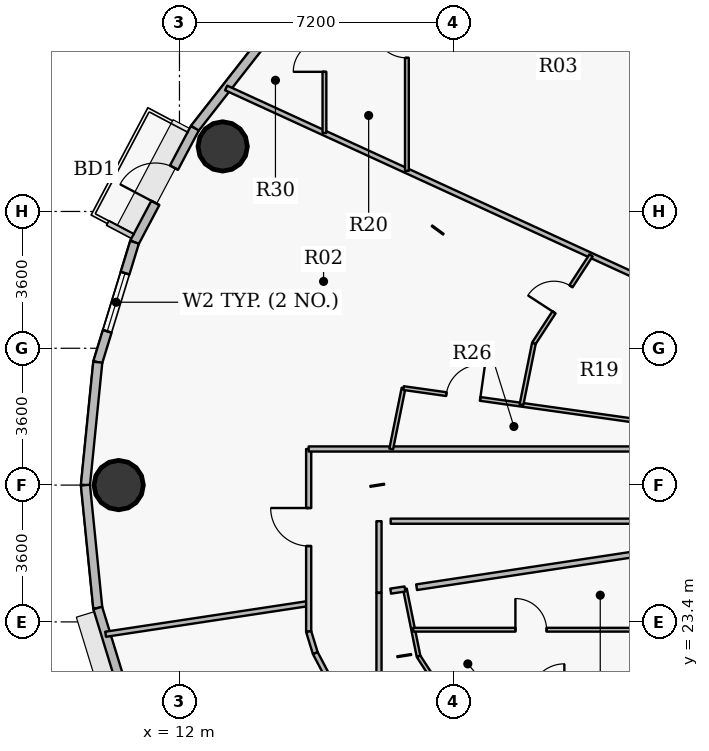
"""IFC4 building model, lengths in metres.
Left out: names, types, materials, properties, quantities, classifications, styles, units other than length and angle.
Written with IfcOpenShell. Run it as: python <this file> out.ifc"""

import sys

from ifc_helpers import new_model, si_unit, direction, frame, frame_2d, origin, origin_2d, place, context, subcontext, project, spatial, rectangle, hollow_circle, extrude, source, transform, mapped, element, fill, save


model = new_model("IFC4")
c1 = context("Model", 3, precision=1e-05, world=origin(), true_north=direction((0.0, 1.0)))
c2 = subcontext(c1, "Body", "Model", "MODEL_VIEW")
j1 = project(units=[si_unit("LENGTHUNIT", "METRE"), si_unit("PLANEANGLEUNIT", "RADIAN")], contexts=[c1])
p1 = place(None, origin())
s1 = spatial("IfcSite", under=j1, at=p1, CompositionType="ELEMENT")
p2 = place(p1, origin())
s2 = spatial("IfcBuilding", under=s1, at=p2, CompositionType="ELEMENT")
p3 = place(p2, frame((0.0, 0.0, 156.15)))
s3 = spatial("IfcBuildingStorey", under=s2, at=p3, CompositionType="ELEMENT", Elevation=156.15)
for number, where, z_axis, x_axis in (
    (1, (13.137, 35.911, 0.0), (0.0, 0.0, 1.0), (1.0, 0.0, 0.0)),
    (2, (10.4, 27.0, 0.0), (0.0, 0.0, 1.0), (1.0, 0.0, 0.0)),
):
    element("IfcColumn", number, at=place(p3, frame(where, z_axis=z_axis, x_axis=x_axis)), inside=s3, PredefinedType="COLUMN", context=c2, shape_type="SweptSolid", body=[
        extrude(hollow_circle(Radius=0.65, WallThickness=0.04, at=origin_2d()), origin(), (0.0, 0.0, 1.0), 3.75),
    ])
p4 = place(p3, frame((12.404, 36.388, 0.0), z_axis=(0.0, 0.0, 1.0), x_axis=(0.616287674549, 0.787521112224, 0.0)))
e3 = element("IfcWall", 3, at=p4, inside=s3, PredefinedType="SOLIDWALL", context=c2, shape_type="SweptSolid", body=[
    extrude(rectangle(XDim=3.517, YDim=0.24, at=frame_2d((1.759, 0.0))), origin(), (0.0, 0.0, 1.0), 3.5),
])
p5 = place(p3, frame((10.817, 33.389, 0.0), z_axis=(0.0, 0.0, 1.0), x_axis=(0.467586874938, 0.88394712194, 0.0)))
e4 = element("IfcWall", 4, at=p5, inside=s3, PredefinedType="SOLIDWALL", context=c2, shape_type="SweptSolid", body=[
    extrude(rectangle(XDim=3.393, YDim=0.24, at=frame_2d((1.697, 0.0))), origin(), (0.0, 0.0, 1.0), 3.5),
])
p6 = place(p5, frame((1.172, 0.0, 0.0)))
e5 = element("IfcOpeningElement", 5, at=p6, cuts=e4, PredefinedType="OPENING", context=c2, shape_type="SweptSolid", body=[
    extrude(rectangle(XDim=1.05, YDim=2.15, at=origin_2d()), frame((0.525, 0.13, 1.075), z_axis=(0.0, -1.0, 0.0), x_axis=(1.0, 0.0, 0.0)), (0.0, 0.0, 1.0), 0.26),
])
p7 = place(p3, frame((9.85, 30.234, 0.0), z_axis=(0.0, 0.0, 1.0), x_axis=(0.293097995113, 0.956082405058, 0.0)))
e6 = element("IfcWall", 6, at=p7, inside=s3, PredefinedType="SOLIDWALL", context=c2, shape_type="SweptSolid", body=[
    extrude(rectangle(XDim=3.3, YDim=0.24, at=frame_2d((1.65, 0.0))), origin(), (0.0, 0.0, 1.0), 3.5),
])
p8 = place(p7, frame((0.85, 0.0, 0.9)))
e7 = element("IfcOpeningElement", 7, at=p8, cuts=e6, PredefinedType="OPENING", context=c2, shape_type="SweptSolid", body=[
    extrude(rectangle(XDim=1.6, YDim=1.75, at=origin_2d()), frame((0.8, 0.13, 0.875), z_axis=(0.0, -1.0, 0.0), x_axis=(1.0, 0.0, 0.0)), (0.0, 0.0, 1.0), 0.26),
])
for number, where, z_axis, x_axis in (
    (8, (9.525, 27.0, 0.0), (0.0, 0.0, 1.0), (0.1, 0.995, 0.0)),
    (9, (9.85, 23.766, 0.0), (0.0, 0.0, 1.0), (-0.1, 0.995, 0.0)),
):
    element("IfcWall", number, at=place(p3, frame(where, z_axis=z_axis, x_axis=x_axis)), inside=s3, PredefinedType="SOLIDWALL", context=c2, shape_type="SweptSolid", body=[
        extrude(rectangle(XDim=3.25, YDim=0.24, at=frame_2d((1.625, 0.0))), origin(), (0.0, 0.0, 1.0), 3.5),
    ])
p9 = place(p3, frame((10.817, 20.611, 0.0), z_axis=(0.0, 0.0, 1.0), x_axis=(-0.293097995113, 0.956082405058, 0.0)))
e10 = element("IfcWall", 10, at=p9, inside=s3, PredefinedType="SOLIDWALL", context=c2, shape_type="SweptSolid", body=[
    extrude(rectangle(XDim=3.3, YDim=0.24, at=frame_2d((1.65, 0.0))), origin(), (0.0, 0.0, 1.0), 3.5),
])
p10 = place(p3, frame((10.057, 23.075, 0.0), z_axis=(0.0, 0.0, 1.0), x_axis=(0.988756022356, 0.14953771516, 0.0)))
e11 = element("IfcWall", 11, at=p10, inside=s3, PredefinedType="PARTITIONING", context=c2, shape_type="SweptSolid", body=[
    extrude(rectangle(XDim=5.404, YDim=0.135, at=frame_2d((2.702, 0.0))), origin(), (0.0, 0.0, 1.0), 2.935),
])
p11 = place(p3, frame((13.229, 37.45, 0.0), z_axis=(0.0, 0.0, 1.0), x_axis=(0.908867611309, -0.417084721746, 0.0)))
e12 = element("IfcWall", 12, at=p11, inside=s3, PredefinedType="PARTITIONING", context=c2, shape_type="SweptSolid", body=[
    extrude(rectangle(XDim=12.237, YDim=0.135, at=frame_2d((6.118, 0.0))), origin(), (0.0, 0.0, 1.0), 2.935),
])
p12 = place(p3, frame((15.4, 23.146, 0.0), z_axis=(0.0, 0.0, 1.0), x_axis=(0.0, 1.0, 0.0)))
e13 = element("IfcWall", 13, at=p12, inside=s3, PredefinedType="PARTITIONING", context=c2, shape_type="SweptSolid", body=[
    extrude(rectangle(XDim=4.804, YDim=0.135, at=frame_2d((2.402, 0.0))), origin(), (0.0, 0.0, 1.0), 2.935),
])
p13 = place(p12, frame((2.251, 0.0, 0.0)))
e14 = element("IfcOpeningElement", 14, at=p13, cuts=e13, PredefinedType="OPENING", context=c2, shape_type="SweptSolid", body=[
    extrude(rectangle(XDim=1.0, YDim=2.15, at=origin_2d()), frame((0.5, 0.078, 1.075), z_axis=(0.0, -1.0, 0.0), x_axis=(1.0, 0.0, 0.0)), (0.0, 0.0, 1.0), 0.155),
])
p14 = place(p3, frame((15.4, 23.146, 0.0), z_axis=(0.0, 0.0, 1.0), x_axis=(0.293335154151, -0.956009669061, 0.0)))
e15 = element("IfcWall", 15, at=p14, inside=s3, PredefinedType="PARTITIONING", context=c2, shape_type="SweptSolid", body=[
    extrude(rectangle(XDim=0.594, YDim=0.135, at=frame_2d((0.297, 0.0))), origin(), (0.0, 0.0, 1.0), 3.5),
])
p15 = place(p3, frame((15.4, 27.95, 0.0), z_axis=(0.0, 0.0, 1.0), x_axis=(1.0, 0.0, 0.0)))
e16 = element("IfcWall", 16, at=p15, inside=s3, PredefinedType="PARTITIONING", context=c2, shape_type="SweptSolid", body=[
    extrude(rectangle(XDim=8.95, YDim=0.135, at=frame_2d((4.475, 0.0))), origin(), (0.0, 0.0, 1.0), 3.5),
])
p16 = place(p3, frame((15.574, 22.578, 0.0), z_axis=(0.0, 0.0, 1.0), x_axis=(0.46757196543, -0.883955008552, 0.0)))
e17 = element("IfcWall", 17, at=p16, inside=s3, PredefinedType="PARTITIONING", context=c2, shape_type="SweptSolid", body=[
    extrude(rectangle(XDim=2.451, YDim=0.135, at=frame_2d((1.226, 0.0))), origin(), (0.0, 0.0, 1.0), 2.935),
])
p17 = place(p3, frame((15.815, 36.263, 0.0), z_axis=(0.0, 0.0, 1.0), x_axis=(0.0, 1.0, 0.0)))
e18 = element("IfcWall", 18, at=p17, inside=s3, PredefinedType="PARTITIONING", context=c2, shape_type="SweptSolid", body=[
    extrude(rectangle(XDim=4.042, YDim=0.1, at=frame_2d((2.021, 0.0))), origin(), (0.0, 0.0, 1.0), 2.935),
])
p18 = place(p17, frame((1.611, 0.0, 0.0)))
e19 = element("IfcOpeningElement", 19, at=p18, cuts=e18, PredefinedType="OPENING", context=c2, shape_type="SweptSolid", body=[
    extrude(rectangle(XDim=0.82, YDim=2.1, at=origin_2d()), frame((0.41, 0.06, 1.05), z_axis=(0.0, -1.0, 0.0), x_axis=(1.0, 0.0, 0.0)), (0.0, 0.0, 1.0), 0.12),
])
p19 = place(p3, frame((17.25, 19.734, 0.0), z_axis=(0.0, 0.0, 1.0), x_axis=(0.0, 1.0, 0.0)))
e20 = element("IfcWall", 20, at=p19, inside=s3, PredefinedType="PARTITIONING", context=c2, shape_type="SweptSolid", body=[
    extrude(rectangle(XDim=4.429, YDim=0.135, at=frame_2d((2.215, 0.0))), origin(), (0.0, 0.0, 1.0), 2.935),
])
p20 = place(p3, frame((17.572, 27.95, 0.0), z_axis=(0.0, 0.0, 1.0), x_axis=(0.19821259699, 0.98015905158, 0.0)))
e21 = element("IfcWall", 21, at=p20, inside=s3, PredefinedType="PARTITIONING", context=c2, shape_type="SweptSolid", body=[
    extrude(rectangle(XDim=1.635, YDim=0.1, at=frame_2d((0.817, 0.0))), origin(), (0.0, 0.0, 1.0), 3.5),
])
p21 = place(p3, frame((17.896, 29.552, 0.0), z_axis=(0.0, 0.0, 1.0), x_axis=(0.990212218954, -0.139569915938, 0.0)))
e22 = element("IfcWall", 22, at=p21, inside=s3, PredefinedType="PARTITIONING", context=c2, shape_type="SweptSolid", body=[
    extrude(rectangle(XDim=6.518, YDim=0.1, at=frame_2d((3.259, 0.0))), origin(), (0.0, 0.0, 1.0), 3.5),
])
p22 = place(p21, frame((1.137, 0.0, 0.0)))
e23 = element("IfcOpeningElement", 23, at=p22, cuts=e22, PredefinedType="OPENING", context=c2, shape_type="SweptSolid", body=[
    extrude(rectangle(XDim=0.9, YDim=2.1, at=origin_2d()), frame((0.45, 0.06, 1.05), z_axis=(0.0, -1.0, 0.0), x_axis=(1.0, 0.0, 0.0)), (0.0, 0.0, 1.0), 0.12),
])
p23 = place(p3, frame((17.933, 24.267, 0.0), z_axis=(0.0, 0.0, 1.0), x_axis=(0.198166528342, -0.980168366682, 0.0)))
e24 = element("IfcWall", 24, at=p23, inside=s3, PredefinedType="PARTITIONING", context=c2, shape_type="SweptSolid", body=[
    extrude(rectangle(XDim=1.809, YDim=0.1, at=frame_2d((0.904, 0.0))), origin(), (0.0, 0.0, 1.0), 2.935),
])
p24 = place(p3, frame((17.984, 35.267, 0.0), z_axis=(0.0, 0.0, 1.0), x_axis=(0.0, 1.0, 0.0)))
e25 = element("IfcWall", 25, at=p24, inside=s3, PredefinedType="PARTITIONING", context=c2, shape_type="SweptSolid", body=[
    extrude(rectangle(XDim=6.848, YDim=0.1, at=frame_2d((3.424, 0.0))), origin(), (0.0, 0.0, 1.0), 2.935),
])
p25 = place(p24, frame((2.974, 0.0, 0.0)))
e26 = element("IfcOpeningElement", 26, at=p25, cuts=e25, PredefinedType="OPENING", context=c2, shape_type="SweptSolid", body=[
    extrude(rectangle(XDim=0.9, YDim=2.1, at=origin_2d()), frame((0.45, 0.06, 1.05), z_axis=(0.0, -1.0, 0.0), x_axis=(1.0, 0.0, 0.0)), (0.0, 0.0, 1.0), 0.12),
])
p26 = place(p3, frame((18.15, 23.195, 0.0), z_axis=(0.0, 0.0, 1.0), x_axis=(1.0, 0.0, 0.0)))
e27 = element("IfcWall", 27, at=p26, inside=s3, PredefinedType="PARTITIONING", context=c2, shape_type="SweptSolid", body=[
    extrude(rectangle(XDim=6.2, YDim=0.1, at=frame_2d((3.1, 0.0))), origin(), (0.0, 0.0, 1.0), 2.935),
])
p27 = place(p26, frame((2.69, 0.0, 0.0)))
e28 = element("IfcOpeningElement", 28, at=p27, cuts=e27, PredefinedType="OPENING", context=c2, shape_type="SweptSolid", body=[
    extrude(rectangle(XDim=0.82, YDim=2.1, at=origin_2d()), frame((0.41, 0.06, 1.05), z_axis=(0.0, -1.0, 0.0), x_axis=(1.0, 0.0, 0.0)), (0.0, 0.0, 1.0), 0.12),
])
p28 = place(p3, frame((18.291, 22.494, 0.0), z_axis=(0.0, 0.0, 1.0), x_axis=(0.545405921784, -0.838172047066, 0.0)))
e29 = element("IfcWall", 29, at=p28, inside=s3, PredefinedType="PARTITIONING", context=c2, shape_type="SweptSolid", body=[
    extrude(rectangle(XDim=4.849, YDim=0.1, at=frame_2d((2.425, 0.0))), origin(), (0.0, 0.0, 1.0), 2.935),
])
p29 = place(p28, frame((1.962, 0.0, 0.0)))
e30 = element("IfcOpeningElement", 30, at=p29, cuts=e29, PredefinedType="OPENING", context=c2, shape_type="SweptSolid", body=[
    extrude(rectangle(XDim=0.9, YDim=2.1, at=origin_2d()), frame((0.45, 0.06, 1.05), z_axis=(0.0, -1.0, 0.0), x_axis=(1.0, 0.0, 0.0)), (0.0, 0.0, 1.0), 0.12),
])
p30 = place(p3, frame((21.0, 29.115, 0.0), z_axis=(0.0, 0.0, 1.0), x_axis=(0.198219197437, 0.980157716782, 0.0)))
e31 = element("IfcWall", 31, at=p30, inside=s3, PredefinedType="PARTITIONING", context=c2, shape_type="SweptSolid", body=[
    extrude(rectangle(XDim=1.652, YDim=0.1, at=frame_2d((0.826, 0.0))), origin(), (0.0, 0.0, 1.0), 3.5),
])
p31 = place(p3, frame((21.327, 30.733, 0.0), z_axis=(0.0, 0.0, 1.0), x_axis=(0.545365017792, 0.838198662233, 0.0)))
e32 = element("IfcWall", 32, at=p31, inside=s3, PredefinedType="PARTITIONING", context=c2, shape_type="SweptSolid", body=[
    extrude(rectangle(XDim=2.756, YDim=0.1, at=frame_2d((1.378, 0.0))), origin(), (0.0, 0.0, 1.0), 2.935),
])
p32 = place(p31, frame((0.968, 0.0, 0.0)))
e33 = element("IfcOpeningElement", 33, at=p32, cuts=e32, PredefinedType="OPENING", context=c2, shape_type="SweptSolid", body=[
    extrude(rectangle(XDim=0.82, YDim=2.1, at=origin_2d()), frame((0.41, 0.06, 1.05), z_axis=(0.0, -1.0, 0.0), x_axis=(1.0, 0.0, 0.0)), (0.0, 0.0, 1.0), 0.12),
])
p33 = place(p3, frame((17.25, 26.05, 0.0), z_axis=(0.0, 0.0, 1.0), x_axis=(0.0, -1.0, 0.0)))
e34 = element("IfcWall", 34, at=p33, inside=s3, PredefinedType="PARTITIONING", context=c2, shape_type="SweptSolid", body=[
    extrude(rectangle(XDim=1.876, YDim=0.135, at=frame_2d((0.938, 0.0))), origin(), (0.0, 0.0, 1.0), 3.185),
])
p34 = place(p3, frame((24.042, 26.05, 0.0), z_axis=(0.0, 0.0, 1.0), x_axis=(-1.0, 0.0, 0.0)))
e35 = element("IfcWall", 35, at=p34, inside=s3, PredefinedType="PARTITIONING", context=c2, shape_type="SweptSolid", body=[
    extrude(rectangle(XDim=6.485, YDim=0.135, at=frame_2d((3.242, 0.0))), origin(), (0.0, 0.0, 1.0), 3.5),
])
p35 = place(p3, frame((17.558, 24.21, 0.0), z_axis=(0.0, 0.0, 1.0), x_axis=(0.988703952477, 0.149881601124, 0.0)))
e36 = element("IfcWall", 36, at=p35, inside=s3, PredefinedType="PARTITIONING", context=c2, shape_type="SweptSolid", body=[
    extrude(rectangle(XDim=0.38, YDim=0.135, at=frame_2d((0.19, 0.0))), origin(), (0.0, 0.0, 1.0), 3.185),
])
p36 = place(p3, frame((18.24, 24.313, 0.0), z_axis=(0.0, 0.0, 1.0), x_axis=(0.988751262043, 0.149569187364, 0.0)))
e37 = element("IfcWall", 37, at=p36, inside=s3, PredefinedType="PARTITIONING", context=c2, shape_type="SweptSolid", body=[
    extrude(rectangle(XDim=5.848, YDim=0.15, at=frame_2d((2.924, 0.0))), origin(), (0.0, 0.0, 1.0), 3.5),
])
m1 = source(origin(), c2, "Body", "SweptSolid", [
    extrude(rectangle(XDim=1.05, YDim=2.15, at=origin_2d()), frame((0.525, 0.025, 1.075), z_axis=(0.0, -1.0, 0.0), x_axis=(1.0, 0.0, 0.0)), (0.0, 0.0, 1.0), 0.05),
])
p37 = place(p6, origin())
e38 = element("IfcDoor", 38, at=p37, inside=s3, OperationType="SINGLE_SWING_LEFT", PredefinedType="DOOR", context=c2, shape_type="MappedRepresentation", body=[
    mapped(m1, transform((0.0, 0.0, 0.0), x_axis=(1.0, 0.0, 0.0), y_axis=(0.0, 1.0, 0.0), z_axis=(0.0, 0.0, 1.0), scale=1.0)),
])
fill(e5, e38)
m2 = source(origin(), c2, "Body", "SweptSolid", [
    extrude(rectangle(XDim=1.6, YDim=1.75, at=origin_2d()), frame((0.8, 0.03, 0.875), z_axis=(0.0, -1.0, 0.0), x_axis=(1.0, 0.0, 0.0)), (0.0, 0.0, 1.0), 0.06),
])
p38 = place(p8, origin())
e39 = element("IfcWindow", 39, at=p38, inside=s3, PartitioningType="DOUBLE_PANEL_VERTICAL", PredefinedType="WINDOW", context=c2, shape_type="MappedRepresentation", body=[
    mapped(m2, transform((0.0, 0.0, 0.0), x_axis=(1.0, 0.0, 0.0), y_axis=(0.0, 1.0, 0.0), z_axis=(0.0, 0.0, 1.0), scale=1.0)),
])
fill(e7, e39)
m3 = source(origin(), c2, "Body", "SweptSolid", [
    extrude(rectangle(XDim=0.9, YDim=2.1, at=origin_2d()), frame((0.45, 0.025, 1.05), z_axis=(0.0, -1.0, 0.0), x_axis=(1.0, 0.0, 0.0)), (0.0, 0.0, 1.0), 0.05),
])
p39 = place(p25, origin())
e40 = element("IfcDoor", 40, at=p39, inside=s3, OperationType="SINGLE_SWING_RIGHT", PredefinedType="DOOR", context=c2, shape_type="MappedRepresentation", body=[
    mapped(m3, transform((0.0, 0.0, 0.0), x_axis=(1.0, 0.0, 0.0), y_axis=(0.0, 1.0, 0.0), z_axis=(0.0, 0.0, 1.0), scale=1.0)),
])
fill(e26, e40)
m4 = source(origin(), c2, "Body", "SweptSolid", [
    extrude(rectangle(XDim=0.82, YDim=2.1, at=origin_2d()), frame((0.41, 0.025, 1.05), z_axis=(0.0, -1.0, 0.0), x_axis=(1.0, 0.0, 0.0)), (0.0, 0.0, 1.0), 0.05),
])
p40 = place(p18, origin())
e41 = element("IfcDoor", 41, at=p40, inside=s3, OperationType="SINGLE_SWING_LEFT", PredefinedType="DOOR", context=c2, shape_type="MappedRepresentation", body=[
    mapped(m4, transform((0.0, 0.0, 0.0), x_axis=(1.0, 0.0, 0.0), y_axis=(0.0, 1.0, 0.0), z_axis=(0.0, 0.0, 1.0), scale=1.0)),
])
fill(e19, e41)
m5 = source(origin(), c2, "Body", "SweptSolid", [
    extrude(rectangle(XDim=1.0, YDim=2.15, at=origin_2d()), frame((0.5, 0.025, 1.075), z_axis=(0.0, -1.0, 0.0), x_axis=(1.0, 0.0, 0.0)), (0.0, 0.0, 1.0), 0.05),
])
p41 = place(p13, origin())
e42 = element("IfcDoor", 42, at=p41, inside=s3, OperationType="SINGLE_SWING_RIGHT", PredefinedType="DOOR", context=c2, shape_type="MappedRepresentation", body=[
    mapped(m5, transform((0.0, 0.0, 0.0), x_axis=(1.0, 0.0, 0.0), y_axis=(0.0, 1.0, 0.0), z_axis=(0.0, 0.0, 1.0), scale=1.0)),
])
fill(e14, e42)
p42 = place(p32, origin())
e43 = element("IfcDoor", 43, at=p42, inside=s3, OperationType="SINGLE_SWING_LEFT", PredefinedType="DOOR", context=c2, shape_type="MappedRepresentation", body=[
    mapped(m4, transform((0.0, 0.0, 0.0), x_axis=(1.0, 0.0, 0.0), y_axis=(0.0, 1.0, 0.0), z_axis=(0.0, 0.0, 1.0), scale=1.0)),
])
fill(e33, e43)
p43 = place(p22, origin())
e44 = element("IfcDoor", 44, at=p43, inside=s3, OperationType="SINGLE_SWING_RIGHT", PredefinedType="DOOR", context=c2, shape_type="MappedRepresentation", body=[
    mapped(m3, transform((0.0, 0.0, 0.0), x_axis=(1.0, 0.0, 0.0), y_axis=(0.0, 1.0, 0.0), z_axis=(0.0, 0.0, 1.0), scale=1.0)),
])
fill(e23, e44)
p44 = place(p27, origin())
e45 = element("IfcDoor", 45, at=p44, inside=s3, OperationType="SINGLE_SWING_LEFT", PredefinedType="DOOR", context=c2, shape_type="MappedRepresentation", body=[
    mapped(m4, transform((0.0, 0.0, 0.0), x_axis=(1.0, 0.0, 0.0), y_axis=(0.0, 1.0, 0.0), z_axis=(0.0, 0.0, 1.0), scale=1.0)),
])
fill(e28, e45)
save(model, sys.argv[1])
